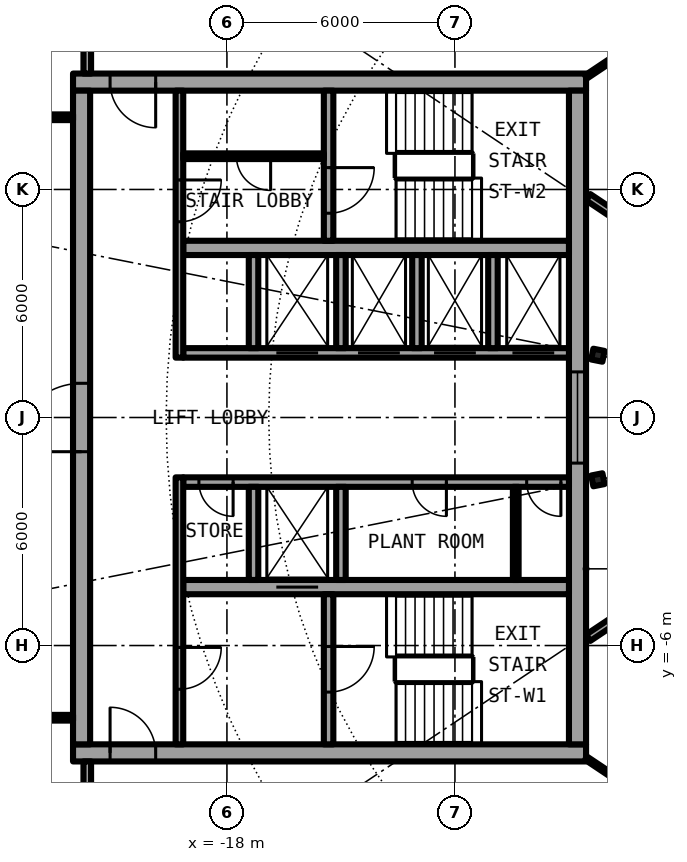
"""IFC4 building model, lengths in metres.
Left out: names, types, materials, properties, quantities, classifications, styles, units other than length and angle.
Written with IfcOpenShell. Run it as: python <this file> out.ifc"""

import sys

from ifc_helpers import new_model, si_unit, direction, frame, frame_2d, origin, origin_2d, place, context, subcontext, project, spatial, rectangle, i_section, extrude, element, fill, save


model = new_model("IFC4")
c1 = context("Model", 3, precision=1e-05, world=origin(), true_north=direction((0.0, 1.0)))
c2 = subcontext(c1, "Body", "Model", "MODEL_VIEW")
j1 = project(units=[si_unit("LENGTHUNIT", "METRE"), si_unit("PLANEANGLEUNIT", "RADIAN")], contexts=[c1])
p1 = place(None, origin())
s1 = spatial("IfcSite", under=j1, at=p1, CompositionType="ELEMENT")
p2 = place(p1, origin())
s2 = spatial("IfcBuilding", under=s1, at=p2, CompositionType="ELEMENT")
p3 = place(p2, frame((0.0, 0.0, 190.2)))
s3 = spatial("IfcBuildingStorey", under=s2, at=p3, CompositionType="ELEMENT", Elevation=190.2)
for number, where, z_axis, x_axis in (
    (1, (-8.239, 1.639, 0.0), (0.0, 0.0, 1.0), (-0.981, 0.195, 0.0)),
    (2, (-8.239, -1.639, 0.0), (0.0, 0.0, 1.0), (-0.981, -0.195, 0.0)),
):
    element("IfcColumn", number, at=place(p3, frame(where, z_axis=z_axis, x_axis=x_axis)), inside=s3, PredefinedType="COLUMN", context=c2, shape_type="SweptSolid", body=[
        extrude(i_section(OverallWidth=0.3, OverallDepth=0.29, WebThickness=0.009, FlangeThickness=0.014, FilletRadius=0.027, at=origin_2d()), origin(), (0.0, 0.0, 1.0), 3.05),
    ])
p4 = place(p3, frame((-22.05, -8.825, 0.0), z_axis=(0.0, 0.0, 1.0), x_axis=(1.0, 0.0, 0.0)))
e3 = element("IfcWall", 3, at=p4, inside=s3, PredefinedType="SHEAR", context=c2, shape_type="SweptSolid", body=[
    extrude(rectangle(XDim=13.5, YDim=0.45, at=frame_2d((6.75, 0.0))), origin(), (0.0, 0.0, 1.0), 3.05),
])
p5 = place(p4, frame((0.975, 0.0, 0.0)))
e4 = element("IfcOpeningElement", 4, at=p5, cuts=e3, PredefinedType="OPENING", context=c2, shape_type="SweptSolid", body=[
    extrude(rectangle(XDim=1.2, YDim=2.3, at=frame_2d((0.6, 1.15))), frame((0.0, 0.235, 0.0), z_axis=(0.0, -1.0, 0.0), x_axis=(1.0, 0.0, 0.0)), (0.0, 0.0, 1.0), 0.47),
])
p6 = place(p3, frame((-8.55, 8.825, 0.0), z_axis=(0.0, 0.0, 1.0), x_axis=(-1.0, 0.0, 0.0)))
e5 = element("IfcWall", 5, at=p6, inside=s3, PredefinedType="SHEAR", context=c2, shape_type="SweptSolid", body=[
    extrude(rectangle(XDim=13.5, YDim=0.45, at=frame_2d((6.75, 0.0))), origin(), (0.0, 0.0, 1.0), 3.05),
])
p7 = place(p6, frame((11.325, 0.0, 0.0)))
e6 = element("IfcOpeningElement", 6, at=p7, cuts=e5, PredefinedType="OPENING", context=c2, shape_type="SweptSolid", body=[
    extrude(rectangle(XDim=1.2, YDim=2.3, at=frame_2d((0.6, 1.15))), frame((0.0, 0.235, 0.0), z_axis=(0.0, -1.0, 0.0), x_axis=(1.0, 0.0, 0.0)), (0.0, 0.0, 1.0), 0.47),
])
p8 = place(p3, frame((-21.825, -8.6, 0.0), z_axis=(0.0, 0.0, 1.0), x_axis=(0.0, 1.0, 0.0)))
e7 = element("IfcWall", 7, at=p8, inside=s3, PredefinedType="SHEAR", context=c2, shape_type="SweptSolid", body=[
    extrude(rectangle(XDim=17.2, YDim=0.45, at=frame_2d((8.6, 0.0))), origin(), (0.0, 0.0, 1.0), 3.05),
])
p9 = place(p8, frame((7.7, 0.0, 0.0)))
e8 = element("IfcOpeningElement", 8, at=p9, cuts=e7, PredefinedType="OPENING", context=c2, shape_type="SweptSolid", body=[
    extrude(rectangle(XDim=1.8, YDim=2.3, at=frame_2d((0.9, 1.15))), frame((0.0, 0.235, 0.0), z_axis=(0.0, -1.0, 0.0), x_axis=(1.0, 0.0, 0.0)), (0.0, 0.0, 1.0), 0.47),
])
p10 = place(p3, frame((-8.775, 8.6, 0.0), z_axis=(0.0, 0.0, 1.0), x_axis=(0.0, -1.0, 0.0)))
e9 = element("IfcWall", 9, at=p10, inside=s3, PredefinedType="SHEAR", context=c2, shape_type="SweptSolid", body=[
    extrude(rectangle(XDim=17.2, YDim=0.45, at=frame_2d((8.6, 0.0))), origin(), (0.0, 0.0, 1.0), 3.05),
])
p11 = place(p10, frame((7.4, 0.0, 0.1)))
e10 = element("IfcOpeningElement", 10, at=p11, cuts=e9, PredefinedType="OPENING", context=c2, shape_type="SweptSolid", body=[
    extrude(rectangle(XDim=2.4, YDim=2.2, at=frame_2d((1.2, 1.1))), frame((0.0, 0.235, 0.0), z_axis=(0.0, -1.0, 0.0), x_axis=(1.0, 0.0, 0.0)), (0.0, 0.0, 1.0), 0.47),
])
p12 = place(p3, frame((-9.0, -1.7, 0.0), z_axis=(0.0, 0.0, 1.0), x_axis=(-1.0, 0.0, 0.0)))
e11 = element("IfcWall", 11, at=p12, inside=s3, PredefinedType="SHEAR", context=c2, shape_type="SweptSolid", body=[
    extrude(rectangle(XDim=10.15, YDim=0.25, at=frame_2d((5.075, 0.0))), origin(), (0.0, 0.0, 1.0), 3.05),
])
p13 = place(p12, frame((0.212, 0.0, 0.0)))
e12 = element("IfcOpeningElement", 12, at=p13, cuts=e11, PredefinedType="OPENING", context=c2, shape_type="SweptSolid", body=[
    extrude(rectangle(XDim=0.9, YDim=2.3, at=frame_2d((0.45, 1.15))), frame((0.0, 0.135, 0.0), z_axis=(0.0, -1.0, 0.0), x_axis=(1.0, 0.0, 0.0)), (0.0, 0.0, 1.0), 0.27),
])
p14 = place(p12, frame((3.225, 0.0, 0.0)))
e13 = element("IfcOpeningElement", 13, at=p14, cuts=e11, PredefinedType="OPENING", context=c2, shape_type="SweptSolid", body=[
    extrude(rectangle(XDim=0.9, YDim=2.3, at=frame_2d((0.45, 1.15))), frame((0.0, 0.135, 0.0), z_axis=(0.0, -1.0, 0.0), x_axis=(1.0, 0.0, 0.0)), (0.0, 0.0, 1.0), 0.27),
])
p15 = place(p12, frame((8.837, 0.0, 0.0)))
e14 = element("IfcOpeningElement", 14, at=p15, cuts=e11, PredefinedType="OPENING", context=c2, shape_type="SweptSolid", body=[
    extrude(rectangle(XDim=0.9, YDim=2.3, at=frame_2d((0.45, 1.15))), frame((0.0, 0.135, 0.0), z_axis=(0.0, -1.0, 0.0), x_axis=(1.0, 0.0, 0.0)), (0.0, 0.0, 1.0), 0.27),
])
p16 = place(p3, frame((-9.0, -4.462, 0.0), z_axis=(0.0, 0.0, 1.0), x_axis=(-1.0, 0.0, 0.0)))
e15 = element("IfcWall", 15, at=p16, inside=s3, PredefinedType="SHEAR", context=c2, shape_type="SweptSolid", body=[
    extrude(rectangle(XDim=10.15, YDim=0.375, at=frame_2d((5.075, 0.0))), origin(), (0.0, 0.0, 1.0), 3.05),
])
p17 = place(p16, frame((6.6, 0.0, 0.0)))
e16 = element("IfcOpeningElement", 16, at=p17, cuts=e15, PredefinedType="OPENING", context=c2, shape_type="SweptSolid", body=[
    extrude(rectangle(XDim=1.1, YDim=2.3, at=frame_2d((0.55, 1.15))), frame((0.0, 0.198, 0.0), z_axis=(0.0, -1.0, 0.0), x_axis=(1.0, 0.0, 0.0)), (0.0, 0.0, 1.0), 0.395),
])
p18 = place(p3, frame((-15.325, -4.65, 0.0), z_axis=(0.0, 0.0, 1.0), x_axis=(0.0, -1.0, 0.0)))
e17 = element("IfcWall", 17, at=p18, inside=s3, PredefinedType="SHEAR", context=c2, shape_type="SweptSolid", body=[
    extrude(rectangle(XDim=3.95, YDim=0.25, at=frame_2d((1.975, 0.0))), origin(), (0.0, 0.0, 1.0), 3.05),
])
p19 = place(p18, frame((1.375, 0.0, 0.0)))
e18 = element("IfcOpeningElement", 18, at=p19, cuts=e17, PredefinedType="OPENING", context=c2, shape_type="SweptSolid", body=[
    extrude(rectangle(XDim=1.2, YDim=2.3, at=frame_2d((0.6, 1.15))), frame((0.0, 0.135, 0.0), z_axis=(0.0, -1.0, 0.0), x_axis=(1.0, 0.0, 0.0)), (0.0, 0.0, 1.0), 0.27),
])
for number, where, z_axis, x_axis in (
    (19, (-15.0, -1.825, 0.0), (0.0, 0.0, 1.0), (0.0, -1.0, 0.0)),
    (20, (-17.3, -1.825, 0.0), (0.0, 0.0, 1.0), (0.0, -1.0, 0.0)),
):
    element("IfcWall", number, at=place(p3, frame(where, z_axis=z_axis, x_axis=x_axis)), inside=s3, PredefinedType="SOLIDWALL", context=c2, shape_type="SweptSolid", body=[
        extrude(rectangle(XDim=2.45, YDim=0.25, at=frame_2d((1.225, 0.0))), origin(), (0.0, 0.0, 1.0), 2.7),
    ])
p20 = place(p3, frame((-19.25, -1.575, 0.0), z_axis=(0.0, 0.0, 1.0), x_axis=(0.0, -1.0, 0.0)))
e21 = element("IfcWall", 21, at=p20, inside=s3, PredefinedType="SOLIDWALL", context=c2, shape_type="SweptSolid", body=[
    extrude(rectangle(XDim=7.025, YDim=0.2, at=frame_2d((3.513, 0.0))), origin(), (0.0, 0.0, 1.0), 2.7),
])
p21 = place(p20, frame((4.475, 0.0, 0.0)))
e22 = element("IfcOpeningElement", 22, at=p21, cuts=e21, PredefinedType="OPENING", context=c2, shape_type="SweptSolid", body=[
    extrude(rectangle(XDim=1.1, YDim=2.3, at=frame_2d((0.55, 1.15))), frame((0.0, 0.11, 0.0), z_axis=(0.0, -1.0, 0.0), x_axis=(1.0, 0.0, 0.0)), (0.0, 0.0, 1.0), 0.22),
])
p22 = place(p3, frame((-9.0, 1.7, 0.0), z_axis=(0.0, 0.0, 1.0), x_axis=(-1.0, 0.0, 0.0)))
e23 = element("IfcWall", 23, at=p22, inside=s3, PredefinedType="SHEAR", context=c2, shape_type="SweptSolid", body=[
    extrude(rectangle(XDim=10.15, YDim=0.25, at=frame_2d((5.075, 0.0))), origin(), (0.0, 0.0, 1.0), 3.05),
])
p23 = place(p22, frame((0.387, 0.0, 0.0)))
e24 = element("IfcOpeningElement", 24, at=p23, cuts=e23, PredefinedType="OPENING", context=c2, shape_type="SweptSolid", body=[
    extrude(rectangle(XDim=1.1, YDim=2.3, at=frame_2d((0.55, 1.15))), frame((0.0, 0.135, 0.0), z_axis=(0.0, -1.0, 0.0), x_axis=(1.0, 0.0, 0.0)), (0.0, 0.0, 1.0), 0.27),
])
p24 = place(p22, frame((2.45, 0.0, 0.0)))
e25 = element("IfcOpeningElement", 25, at=p24, cuts=e23, PredefinedType="OPENING", context=c2, shape_type="SweptSolid", body=[
    extrude(rectangle(XDim=1.1, YDim=2.3, at=frame_2d((0.55, 1.15))), frame((0.0, 0.135, 0.0), z_axis=(0.0, -1.0, 0.0), x_axis=(1.0, 0.0, 0.0)), (0.0, 0.0, 1.0), 0.27),
])
p25 = place(p22, frame((4.45, 0.0, 0.0)))
e26 = element("IfcOpeningElement", 26, at=p25, cuts=e23, PredefinedType="OPENING", context=c2, shape_type="SweptSolid", body=[
    extrude(rectangle(XDim=1.1, YDim=2.3, at=frame_2d((0.55, 1.15))), frame((0.0, 0.135, 0.0), z_axis=(0.0, -1.0, 0.0), x_axis=(1.0, 0.0, 0.0)), (0.0, 0.0, 1.0), 0.27),
])
p26 = place(p22, frame((6.6, 0.0, 0.0)))
e27 = element("IfcOpeningElement", 27, at=p26, cuts=e23, PredefinedType="OPENING", context=c2, shape_type="SweptSolid", body=[
    extrude(rectangle(XDim=1.1, YDim=2.3, at=frame_2d((0.55, 1.15))), frame((0.0, 0.135, 0.0), z_axis=(0.0, -1.0, 0.0), x_axis=(1.0, 0.0, 0.0)), (0.0, 0.0, 1.0), 0.27),
])
p27 = place(p3, frame((-9.0, 4.462, 0.0), z_axis=(0.0, 0.0, 1.0), x_axis=(-1.0, 0.0, 0.0)))
e28 = element("IfcWall", 28, at=p27, inside=s3, PredefinedType="SHEAR", context=c2, shape_type="SweptSolid", body=[
    extrude(rectangle(XDim=10.15, YDim=0.375, at=frame_2d((5.075, 0.0))), origin(), (0.0, 0.0, 1.0), 3.05),
])
p28 = place(p3, frame((-15.325, 8.6, 0.0), z_axis=(0.0, 0.0, 1.0), x_axis=(0.0, -1.0, 0.0)))
e29 = element("IfcWall", 29, at=p28, inside=s3, PredefinedType="SHEAR", context=c2, shape_type="SweptSolid", body=[
    extrude(rectangle(XDim=3.95, YDim=0.25, at=frame_2d((1.975, 0.0))), origin(), (0.0, 0.0, 1.0), 3.05),
])
p29 = place(p28, frame((2.025, 0.0, 0.0)))
e30 = element("IfcOpeningElement", 30, at=p29, cuts=e29, PredefinedType="OPENING", context=c2, shape_type="SweptSolid", body=[
    extrude(rectangle(XDim=1.2, YDim=2.3, at=frame_2d((0.6, 1.15))), frame((0.0, 0.135, 0.0), z_axis=(0.0, -1.0, 0.0), x_axis=(1.0, 0.0, 0.0)), (0.0, 0.0, 1.0), 0.27),
])
for number, where, z_axis, x_axis in (
    (31, (-15.0, 1.825, 0.0), (0.0, 0.0, 1.0), (0.0, 1.0, 0.0)),
    (32, (-17.3, 1.825, 0.0), (0.0, 0.0, 1.0), (0.0, 1.0, 0.0)),
):
    element("IfcWall", number, at=place(p3, frame(where, z_axis=z_axis, x_axis=x_axis)), inside=s3, PredefinedType="SOLIDWALL", context=c2, shape_type="SweptSolid", body=[
        extrude(rectangle(XDim=2.45, YDim=0.25, at=frame_2d((1.225, 0.0))), origin(), (0.0, 0.0, 1.0), 2.7),
    ])
p30 = place(p3, frame((-19.25, 8.6, 0.0), z_axis=(0.0, 0.0, 1.0), x_axis=(0.0, -1.0, 0.0)))
e33 = element("IfcWall", 33, at=p30, inside=s3, PredefinedType="SOLIDWALL", context=c2, shape_type="SweptSolid", body=[
    extrude(rectangle(XDim=7.025, YDim=0.2, at=frame_2d((3.513, 0.0))), origin(), (0.0, 0.0, 1.0), 2.7),
])
p31 = place(p30, frame((2.35, 0.0, 0.0)))
e34 = element("IfcOpeningElement", 34, at=p31, cuts=e33, PredefinedType="OPENING", context=c2, shape_type="SweptSolid", body=[
    extrude(rectangle(XDim=1.1, YDim=2.3, at=frame_2d((0.55, 1.15))), frame((0.0, 0.11, 0.0), z_axis=(0.0, -1.0, 0.0), x_axis=(1.0, 0.0, 0.0)), (0.0, 0.0, 1.0), 0.22),
])
for number, where, z_axis, x_axis in (
    (35, (-11.0, 1.825, 0.0), (0.0, 0.0, 1.0), (0.0, 1.0, 0.0)),
    (36, (-13.0, 1.825, 0.0), (0.0, 0.0, 1.0), (0.0, 1.0, 0.0)),
):
    element("IfcWall", number, at=place(p3, frame(where, z_axis=z_axis, x_axis=x_axis)), inside=s3, PredefinedType="SOLIDWALL", context=c2, shape_type="SweptSolid", body=[
        extrude(rectangle(XDim=2.45, YDim=0.25, at=frame_2d((1.225, 0.0))), origin(), (0.0, 0.0, 1.0), 2.7),
    ])
p32 = place(p3, frame((-10.4, -1.825, 0.0), z_axis=(0.0, 0.0, 1.0), x_axis=(0.0, -1.0, 0.0)))
e37 = element("IfcWall", 37, at=p32, inside=s3, PredefinedType="PARTITIONING", context=c2, shape_type="SweptSolid", body=[
    extrude(rectangle(XDim=2.45, YDim=0.15, at=frame_2d((1.225, 0.0))), origin(), (0.0, 0.0, 1.0), 2.7),
])
p33 = place(p3, frame((-15.45, 6.875, 0.0), z_axis=(0.0, 0.0, 1.0), x_axis=(-1.0, 0.0, 0.0)))
e38 = element("IfcWall", 38, at=p33, inside=s3, PredefinedType="PARTITIONING", context=c2, shape_type="SweptSolid", body=[
    extrude(rectangle(XDim=3.7, YDim=0.15, at=frame_2d((1.85, 0.0))), origin(), (0.0, 0.0, 1.0), 2.7),
])
p34 = place(p33, frame((1.4, 0.0, 0.0)))
e39 = element("IfcOpeningElement", 39, at=p34, cuts=e38, PredefinedType="OPENING", context=c2, shape_type="SweptSolid", body=[
    extrude(rectangle(XDim=0.9, YDim=2.3, at=frame_2d((0.45, 1.15))), frame((0.0, 0.085, 0.0), z_axis=(0.0, -1.0, 0.0), x_axis=(1.0, 0.0, 0.0)), (0.0, 0.0, 1.0), 0.17),
])
for number, where, z_axis, x_axis in (
    (40, (-22.05, 7.9, 0.0), (0.0, 0.0, 1.0), (-1.0, 0.0, 0.0)),
    (41, (-22.05, -7.9, 0.0), (0.0, 0.0, 1.0), (-1.0, 0.0, 0.0)),
):
    element("IfcWall", number, at=place(p3, frame(where, z_axis=z_axis, x_axis=x_axis)), inside=s3, PredefinedType="PARTITIONING", context=c2, shape_type="SweptSolid", body=[
        extrude(rectangle(XDim=2.89, YDim=0.15, at=frame_2d((1.445, 0.0))), origin(), (0.0, 0.0, 1.0), 2.7),
    ])
p35 = place(p3, frame((-8.549, -8.965, 0.0), z_axis=(0.0, 0.0, 1.0), x_axis=(0.831463102602, -0.555579975352, 0.0)))
e42 = element("IfcWall", 42, at=p35, inside=s3, PredefinedType="PARTITIONING", context=c2, shape_type="SweptSolid", body=[
    extrude(rectangle(XDim=3.393, YDim=0.1, at=frame_2d((1.696, 0.0))), origin(), (0.0, 0.0, 1.0), 2.7),
])
for number, where, z_axis, x_axis in (
    (43, (-6.513, -4.472, 0.0), (0.0, 0.0, 1.0), (-0.831, -0.556, 0.0)),
    (44, (-6.513, 4.472, 0.0), (0.0, 0.0, 1.0), (-0.831, 0.556, 0.0)),
):
    element("IfcWall", number, at=place(p3, frame(where, z_axis=z_axis, x_axis=x_axis)), inside=s3, PredefinedType="PARTITIONING", context=c2, shape_type="SweptSolid", body=[
        extrude(rectangle(XDim=2.383, YDim=0.2, at=frame_2d((1.191, 0.0))), origin(), (0.0, 0.0, 1.0), 2.7),
    ])
p36 = place(p3, frame((-8.55, 8.963, 0.0), z_axis=(0.0, 0.0, 1.0), x_axis=(0.83129689803, 0.555828631257, 0.0)))
e45 = element("IfcWall", 45, at=p36, inside=s3, PredefinedType="PARTITIONING", context=c2, shape_type="SweptSolid", body=[
    extrude(rectangle(XDim=3.394, YDim=0.1, at=frame_2d((1.697, 0.0))), origin(), (0.0, 0.0, 1.0), 2.7),
])
for number, where, z_axis, x_axis in (
    (46, (-21.675, -10.825, 0.0), (0.0, 0.0, 1.0), (0.0, 1.0, 0.0)),
    (47, (-21.675, 9.05, 0.0), (0.0, 0.0, 1.0), (0.0, 1.0, 0.0)),
):
    element("IfcWall", number, at=place(p3, frame(where, z_axis=z_axis, x_axis=x_axis)), inside=s3, PredefinedType="PARTITIONING", context=c2, shape_type="SweptSolid", body=[
        extrude(rectangle(XDim=1.775, YDim=0.2, at=frame_2d((0.887, 0.0))), origin(), (0.0, 0.0, 1.0), 2.7),
    ])
p37 = place(p17, origin())
e48 = element("IfcDoor", 48, at=p37, inside=s3, OperationType="DOUBLE_DOOR_SLIDING", PredefinedType="DOOR", context=c2, shape_type="SweptSolid", body=[
    extrude(rectangle(XDim=1.1, YDim=2.3, at=frame_2d((0.55, 1.15))), frame((0.0, 0.025, 0.0), z_axis=(0.0, -1.0, 0.0), x_axis=(1.0, 0.0, 0.0)), (0.0, 0.0, 1.0), 0.05),
])
fill(e16, e48)
p38 = place(p23, origin())
e49 = element("IfcDoor", 49, at=p38, inside=s3, OperationType="DOUBLE_DOOR_SLIDING", PredefinedType="DOOR", context=c2, shape_type="SweptSolid", body=[
    extrude(rectangle(XDim=1.1, YDim=2.3, at=frame_2d((0.55, 1.15))), frame((0.0, 0.025, 0.0), z_axis=(0.0, -1.0, 0.0), x_axis=(1.0, 0.0, 0.0)), (0.0, 0.0, 1.0), 0.05),
])
fill(e24, e49)
p39 = place(p24, origin())
e50 = element("IfcDoor", 50, at=p39, inside=s3, OperationType="DOUBLE_DOOR_SLIDING", PredefinedType="DOOR", context=c2, shape_type="SweptSolid", body=[
    extrude(rectangle(XDim=1.1, YDim=2.3, at=frame_2d((0.55, 1.15))), frame((0.0, 0.025, 0.0), z_axis=(0.0, -1.0, 0.0), x_axis=(1.0, 0.0, 0.0)), (0.0, 0.0, 1.0), 0.05),
])
fill(e25, e50)
p40 = place(p25, origin())
e51 = element("IfcDoor", 51, at=p40, inside=s3, OperationType="DOUBLE_DOOR_SLIDING", PredefinedType="DOOR", context=c2, shape_type="SweptSolid", body=[
    extrude(rectangle(XDim=1.1, YDim=2.3, at=frame_2d((0.55, 1.15))), frame((0.0, 0.025, 0.0), z_axis=(0.0, -1.0, 0.0), x_axis=(1.0, 0.0, 0.0)), (0.0, 0.0, 1.0), 0.05),
])
fill(e26, e51)
p41 = place(p26, origin())
e52 = element("IfcDoor", 52, at=p41, inside=s3, OperationType="DOUBLE_DOOR_SLIDING", PredefinedType="DOOR", context=c2, shape_type="SweptSolid", body=[
    extrude(rectangle(XDim=1.1, YDim=2.3, at=frame_2d((0.55, 1.15))), frame((0.0, 0.025, 0.0), z_axis=(0.0, -1.0, 0.0), x_axis=(1.0, 0.0, 0.0)), (0.0, 0.0, 1.0), 0.05),
])
fill(e27, e52)
p42 = place(p13, origin())
e53 = element("IfcDoor", 53, at=p42, inside=s3, OperationType="SINGLE_SWING_RIGHT", PredefinedType="DOOR", context=c2, shape_type="SweptSolid", body=[
    extrude(rectangle(XDim=0.9, YDim=2.3, at=frame_2d((0.45, 1.15))), frame((0.0, 0.025, 0.0), z_axis=(0.0, -1.0, 0.0), x_axis=(1.0, 0.0, 0.0)), (0.0, 0.0, 1.0), 0.05),
])
fill(e12, e53)
p43 = place(p14, origin())
e54 = element("IfcDoor", 54, at=p43, inside=s3, OperationType="SINGLE_SWING_RIGHT", PredefinedType="DOOR", context=c2, shape_type="SweptSolid", body=[
    extrude(rectangle(XDim=0.9, YDim=2.3, at=frame_2d((0.45, 1.15))), frame((0.0, 0.025, 0.0), z_axis=(0.0, -1.0, 0.0), x_axis=(1.0, 0.0, 0.0)), (0.0, 0.0, 1.0), 0.05),
])
fill(e13, e54)
p44 = place(p15, origin())
e55 = element("IfcDoor", 55, at=p44, inside=s3, OperationType="SINGLE_SWING_LEFT", PredefinedType="DOOR", context=c2, shape_type="SweptSolid", body=[
    extrude(rectangle(XDim=0.9, YDim=2.3, at=frame_2d((0.45, 1.15))), frame((0.0, 0.025, 0.0), z_axis=(0.0, -1.0, 0.0), x_axis=(1.0, 0.0, 0.0)), (0.0, 0.0, 1.0), 0.05),
])
fill(e14, e55)
p45 = place(p34, origin())
e56 = element("IfcDoor", 56, at=p45, inside=s3, OperationType="SINGLE_SWING_LEFT", PredefinedType="DOOR", context=c2, shape_type="SweptSolid", body=[
    extrude(rectangle(XDim=0.9, YDim=2.3, at=frame_2d((0.45, 1.15))), frame((0.0, 0.025, 0.0), z_axis=(0.0, -1.0, 0.0), x_axis=(1.0, 0.0, 0.0)), (0.0, 0.0, 1.0), 0.05),
])
fill(e39, e56)
p46 = place(p19, origin())
e57 = element("IfcDoor", 57, at=p46, inside=s3, OperationType="SINGLE_SWING_LEFT", PredefinedType="DOOR", context=c2, shape_type="SweptSolid", body=[
    extrude(rectangle(XDim=1.2, YDim=2.3, at=frame_2d((0.6, 1.15))), frame((0.0, 0.025, 0.0), z_axis=(0.0, -1.0, 0.0), x_axis=(1.0, 0.0, 0.0)), (0.0, 0.0, 1.0), 0.05),
])
fill(e18, e57)
p47 = place(p29, origin())
e58 = element("IfcDoor", 58, at=p47, inside=s3, OperationType="SINGLE_SWING_LEFT", PredefinedType="DOOR", context=c2, shape_type="SweptSolid", body=[
    extrude(rectangle(XDim=1.2, YDim=2.3, at=frame_2d((0.6, 1.15))), frame((0.0, 0.025, 0.0), z_axis=(0.0, -1.0, 0.0), x_axis=(1.0, 0.0, 0.0)), (0.0, 0.0, 1.0), 0.05),
])
fill(e30, e58)
p48 = place(p21, origin())
e59 = element("IfcDoor", 59, at=p48, inside=s3, OperationType="SINGLE_SWING_LEFT", PredefinedType="DOOR", context=c2, shape_type="SweptSolid", body=[
    extrude(rectangle(XDim=1.1, YDim=2.3, at=frame_2d((0.55, 1.15))), frame((0.0, 0.025, 0.0), z_axis=(0.0, -1.0, 0.0), x_axis=(1.0, 0.0, 0.0)), (0.0, 0.0, 1.0), 0.05),
])
fill(e22, e59)
p49 = place(p31, origin())
e60 = element("IfcDoor", 60, at=p49, inside=s3, OperationType="SINGLE_SWING_RIGHT", PredefinedType="DOOR", context=c2, shape_type="SweptSolid", body=[
    extrude(rectangle(XDim=1.1, YDim=2.3, at=frame_2d((0.55, 1.15))), frame((0.0, 0.025, 0.0), z_axis=(0.0, -1.0, 0.0), x_axis=(1.0, 0.0, 0.0)), (0.0, 0.0, 1.0), 0.05),
])
fill(e34, e60)
p50 = place(p5, origin())
e61 = element("IfcDoor", 61, at=p50, inside=s3, OperationType="SINGLE_SWING_RIGHT", PredefinedType="DOOR", context=c2, shape_type="SweptSolid", body=[
    extrude(rectangle(XDim=1.2, YDim=2.3, at=frame_2d((0.6, 1.15))), frame((0.0, 0.025, 0.0), z_axis=(0.0, -1.0, 0.0), x_axis=(1.0, 0.0, 0.0)), (0.0, 0.0, 1.0), 0.05),
])
fill(e4, e61)
p51 = place(p7, origin())
e62 = element("IfcDoor", 62, at=p51, inside=s3, OperationType="SINGLE_SWING_LEFT", PredefinedType="DOOR", context=c2, shape_type="SweptSolid", body=[
    extrude(rectangle(XDim=1.2, YDim=2.3, at=frame_2d((0.6, 1.15))), frame((0.0, 0.025, 0.0), z_axis=(0.0, -1.0, 0.0), x_axis=(1.0, 0.0, 0.0)), (0.0, 0.0, 1.0), 0.05),
])
fill(e6, e62)
p52 = place(p9, origin())
e63 = element("IfcDoor", 63, at=p52, inside=s3, OperationType="SINGLE_SWING_LEFT", PredefinedType="DOOR", context=c2, shape_type="SweptSolid", body=[
    extrude(rectangle(XDim=1.8, YDim=2.3, at=frame_2d((0.9, 1.15))), frame((0.0, 0.025, 0.0), z_axis=(0.0, -1.0, 0.0), x_axis=(1.0, 0.0, 0.0)), (0.0, 0.0, 1.0), 0.05),
])
fill(e8, e63)
p53 = place(p11, origin())
e64 = element("IfcWindow", 64, at=p53, inside=s3, PartitioningType="SINGLE_PANEL", PredefinedType="WINDOW", context=c2, shape_type="SweptSolid", body=[
    extrude(rectangle(XDim=2.4, YDim=2.2, at=frame_2d((1.2, 1.1))), frame((0.0, 0.03, 0.0), z_axis=(0.0, -1.0, 0.0), x_axis=(1.0, 0.0, 0.0)), (0.0, 0.0, 1.0), 0.06),
])
fill(e10, e64)
save(model, sys.argv[1])
